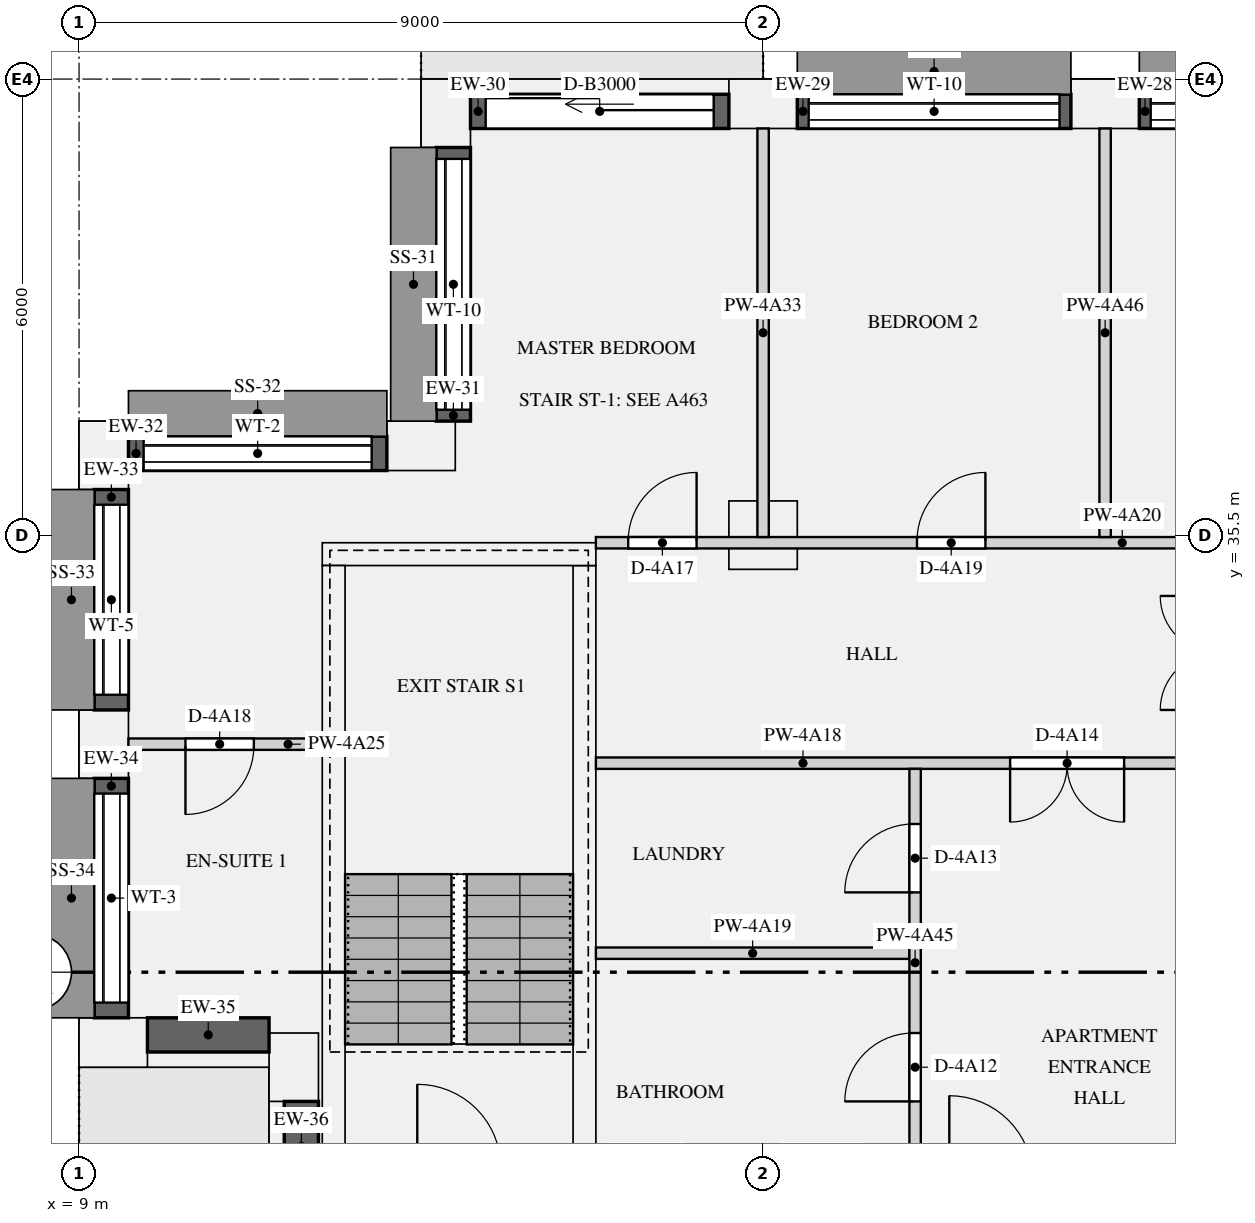
"""IFC4 building model, lengths in metres.
Left out: names, types, materials, properties, quantities, classifications, styles, units other than length and angle.
Written with IfcOpenShell. Run it as: python <this file> out.ifc"""

import sys

from ifc_helpers import new_model, si_unit, direction, frame, frame_2d, origin, origin_2d, place, context, subcontext, project, spatial, rectangle, extrude, element, fill, save


model = new_model("IFC4")
c1 = context("Model", 3, precision=1e-05, world=origin(), true_north=direction((0.0, 1.0)))
c2 = subcontext(c1, "Body", "Model", "MODEL_VIEW")
j1 = project(units=[si_unit("LENGTHUNIT", "METRE"), si_unit("PLANEANGLEUNIT", "RADIAN")], contexts=[c1])
p1 = place(None, origin())
s1 = spatial("IfcSite", under=j1, at=p1, CompositionType="ELEMENT")
p2 = place(p1, origin())
s2 = spatial("IfcBuilding", under=s1, at=p2, CompositionType="ELEMENT")
p3 = place(p2, frame((0.0, 0.0, 198.0)))
s3 = spatial("IfcBuildingStorey", under=s2, at=p3, CompositionType="ELEMENT", Elevation=198.0)
for number, where, z_axis, x_axis in (
    (1, (22.5, 41.175, 0.0), (0.0, 0.0, 1.0), (-1.0, 0.0, 0.0)),
    (2, (18.0, 41.175, 0.0), (0.0, 0.0, 1.0), (-1.0, 0.0, 0.0)),
    (3, (13.825, 41.05, 0.0), (0.0, 0.0, 1.0), (0.0, -1.0, 0.0)),
    (4, (13.5, 36.675, 0.0), (0.0, 0.0, 1.0), (-1.0, 0.0, 0.0)),
    (5, (9.325, 36.55, 0.0), (0.0, 0.0, 1.0), (0.0, -1.0, 0.0)),
    (6, (9.325, 32.75, 0.0), (0.0, 0.0, 1.0), (0.0, -1.0, 0.0)),
    (7, (9.45, 28.825, 0.0), (0.0, 0.0, 1.0), (1.0, 0.0, 0.0)),
    (8, (11.825, 28.5, 0.0), (0.0, 0.0, 1.0), (0.0, -1.0, 0.0)),
):
    element("IfcColumn", number, at=place(p3, frame(where, z_axis=z_axis, x_axis=x_axis)), inside=s3, PredefinedType="USERDEFINED", context=c2, shape_type="SweptSolid", body=[
        extrude(rectangle(XDim=0.9, YDim=0.65, at=origin_2d()), origin(), (0.0, 0.0, 1.0), 3.15),
    ])
p4 = place(p3, frame((18.0, 35.5, 0.0), z_axis=(0.0, 0.0, 1.0), x_axis=(1.0, 0.0, 0.0)))
e9 = element("IfcColumn", 9, at=p4, inside=s3, PredefinedType="COLUMN", context=c2, shape_type="SweptSolid", body=[
    extrude(rectangle(XDim=0.9, YDim=0.9, at=origin_2d()), origin(), (0.0, 0.0, 1.0), 3.15),
])
p5 = place(p3, frame((12.2, 35.25, 0.0), z_axis=(0.0, 0.0, 1.0), x_axis=(1.0, 0.0, 0.0)))
e10 = element("IfcWall", 10, at=p5, inside=s3, PredefinedType="SHEAR", context=c2, shape_type="SweptSolid", body=[
    extrude(rectangle(XDim=3.6, YDim=0.3, at=frame_2d((1.8, 0.0))), origin(), (0.0, 0.0, 1.0), 3.15),
])
for number, where, z_axis, x_axis in (
    (11, (12.35, 27.3, 0.0), (0.0, 0.0, 1.0), (0.0, 1.0, 0.0)),
    (12, (15.65, 27.3, 0.0), (0.0, 0.0, 1.0), (0.0, 1.0, 0.0)),
):
    element("IfcWall", number, at=place(p3, frame(where, z_axis=z_axis, x_axis=x_axis)), inside=s3, PredefinedType="SHEAR", context=c2, shape_type="SweptSolid", body=[
        extrude(rectangle(XDim=7.8, YDim=0.3, at=frame_2d((3.9, 0.0))), origin(), (0.0, 0.0, 1.0), 3.15),
    ])
p6 = place(p3, frame((26.55, 41.075, 0.9), z_axis=(0.0, 0.0, 1.0), x_axis=(-1.0, 0.0, 0.0)))
e13 = element("IfcWall", 13, at=p6, inside=s3, PredefinedType="SOLIDWALL", context=c2, shape_type="SweptSolid", body=[
    extrude(rectangle(XDim=3.6, YDim=0.45, at=frame_2d((1.8, 0.0))), origin(), (0.0, 0.0, 1.0), 1.93),
])
p7 = place(p6, frame((0.15, 0.0, 0.15)))
e14 = element("IfcOpeningElement", 14, at=p7, cuts=e13, PredefinedType="OPENING", context=c2, shape_type="SweptSolid", body=[
    extrude(rectangle(XDim=3.3, YDim=1.5, at=frame_2d((1.65, 0.75))), frame((0.0, 0.235, 0.0), z_axis=(0.0, -1.0, 0.0), x_axis=(1.0, 0.0, 0.0)), (0.0, 0.0, 1.0), 0.47),
])
p8 = place(p3, frame((22.05, 41.075, 0.9), z_axis=(0.0, 0.0, 1.0), x_axis=(-1.0, 0.0, 0.0)))
e15 = element("IfcWall", 15, at=p8, inside=s3, PredefinedType="SOLIDWALL", context=c2, shape_type="SweptSolid", body=[
    extrude(rectangle(XDim=3.6, YDim=0.45, at=frame_2d((1.8, 0.0))), origin(), (0.0, 0.0, 1.0), 1.93),
])
p9 = place(p8, frame((0.15, 0.0, 0.15)))
e16 = element("IfcOpeningElement", 16, at=p9, cuts=e15, PredefinedType="OPENING", context=c2, shape_type="SweptSolid", body=[
    extrude(rectangle(XDim=3.3, YDim=1.5, at=frame_2d((1.65, 0.75))), frame((0.0, 0.235, 0.0), z_axis=(0.0, -1.0, 0.0), x_axis=(1.0, 0.0, 0.0)), (0.0, 0.0, 1.0), 0.47),
])
p10 = place(p3, frame((17.55, 41.075, 0.0), z_axis=(0.0, 0.0, 1.0), x_axis=(-1.0, 0.0, 0.0)))
e17 = element("IfcWall", 17, at=p10, inside=s3, PredefinedType="SOLIDWALL", context=c2, shape_type="SweptSolid", body=[
    extrude(rectangle(XDim=3.4, YDim=0.45, at=frame_2d((1.7, 0.0))), origin(), (0.0, 0.0, 1.0), 2.83),
])
p11 = place(p10, frame((0.2, 0.0, 0.0)))
e18 = element("IfcOpeningElement", 18, at=p11, cuts=e17, PredefinedType="OPENING", context=c2, shape_type="SweptSolid", body=[
    extrude(rectangle(XDim=3.0, YDim=2.3, at=frame_2d((1.5, 1.15))), frame((0.0, 0.235, 0.0), z_axis=(0.0, -1.0, 0.0), x_axis=(1.0, 0.0, 0.0)), (0.0, 0.0, 1.0), 0.47),
])
p12 = place(p3, frame((13.925, 40.6, 0.9), z_axis=(0.0, 0.0, 1.0), x_axis=(0.0, -1.0, 0.0)))
e19 = element("IfcWall", 19, at=p12, inside=s3, PredefinedType="SOLIDWALL", context=c2, shape_type="SweptSolid", body=[
    extrude(rectangle(XDim=3.6, YDim=0.45, at=frame_2d((1.8, 0.0))), origin(), (0.0, 0.0, 1.0), 1.93),
])
p13 = place(p12, frame((0.15, 0.0, 0.15)))
e20 = element("IfcOpeningElement", 20, at=p13, cuts=e19, PredefinedType="OPENING", context=c2, shape_type="SweptSolid", body=[
    extrude(rectangle(XDim=3.3, YDim=1.5, at=frame_2d((1.65, 0.75))), frame((0.0, 0.235, 0.0), z_axis=(0.0, -1.0, 0.0), x_axis=(1.0, 0.0, 0.0)), (0.0, 0.0, 1.0), 0.47),
])
p14 = place(p3, frame((13.05, 36.575, 0.9), z_axis=(0.0, 0.0, 1.0), x_axis=(-1.0, 0.0, 0.0)))
e21 = element("IfcWall", 21, at=p14, inside=s3, PredefinedType="SOLIDWALL", context=c2, shape_type="SweptSolid", body=[
    extrude(rectangle(XDim=3.4, YDim=0.45, at=frame_2d((1.7, 0.0))), origin(), (0.0, 0.0, 1.0), 1.93),
])
p15 = place(p14, frame((0.2, 0.0, 0.15)))
e22 = element("IfcOpeningElement", 22, at=p15, cuts=e21, PredefinedType="OPENING", context=c2, shape_type="SweptSolid", body=[
    extrude(rectangle(XDim=3.0, YDim=1.5, at=frame_2d((1.5, 0.75))), frame((0.0, 0.235, 0.0), z_axis=(0.0, -1.0, 0.0), x_axis=(1.0, 0.0, 0.0)), (0.0, 0.0, 1.0), 0.47),
])
p16 = place(p3, frame((9.425, 36.1, 0.9), z_axis=(0.0, 0.0, 1.0), x_axis=(0.0, -1.0, 0.0)))
e23 = element("IfcWall", 23, at=p16, inside=s3, PredefinedType="SOLIDWALL", context=c2, shape_type="SweptSolid", body=[
    extrude(rectangle(XDim=2.9, YDim=0.45, at=frame_2d((1.45, 0.0))), origin(), (0.0, 0.0, 1.0), 1.93),
])
p17 = place(p16, frame((0.2, 0.0, 0.15)))
e24 = element("IfcOpeningElement", 24, at=p17, cuts=e23, PredefinedType="OPENING", context=c2, shape_type="SweptSolid", body=[
    extrude(rectangle(XDim=2.5, YDim=1.5, at=frame_2d((1.25, 0.75))), frame((0.0, 0.235, 0.0), z_axis=(0.0, -1.0, 0.0), x_axis=(1.0, 0.0, 0.0)), (0.0, 0.0, 1.0), 0.47),
])
p18 = place(p3, frame((9.425, 32.3, 0.9), z_axis=(0.0, 0.0, 1.0), x_axis=(0.0, -1.0, 0.0)))
e25 = element("IfcWall", 25, at=p18, inside=s3, PredefinedType="SOLIDWALL", context=c2, shape_type="SweptSolid", body=[
    extrude(rectangle(XDim=3.15, YDim=0.45, at=frame_2d((1.575, 0.0))), origin(), (0.0, 0.0, 1.0), 1.93),
])
p19 = place(p18, frame((0.2, 0.0, 0.15)))
e26 = element("IfcOpeningElement", 26, at=p19, cuts=e25, PredefinedType="OPENING", context=c2, shape_type="SweptSolid", body=[
    extrude(rectangle(XDim=2.75, YDim=1.5, at=frame_2d((1.375, 0.75))), frame((0.0, 0.235, 0.0), z_axis=(0.0, -1.0, 0.0), x_axis=(1.0, 0.0, 0.0)), (0.0, 0.0, 1.0), 0.47),
])
p20 = place(p3, frame((9.9, 28.925, 0.9), z_axis=(0.0, 0.0, 1.0), x_axis=(1.0, 0.0, 0.0)))
e27 = element("IfcWall", 27, at=p20, inside=s3, PredefinedType="SOLIDWALL", context=c2, shape_type="SweptSolid", body=[
    extrude(rectangle(XDim=1.6, YDim=0.45, at=frame_2d((0.8, 0.0))), origin(), (0.0, 0.0, 1.0), 1.93),
])
p21 = place(p3, frame((11.925, 28.05, 0.0), z_axis=(0.0, 0.0, 1.0), x_axis=(0.0, -1.0, 0.0)))
e28 = element("IfcWall", 28, at=p21, inside=s3, PredefinedType="SOLIDWALL", context=c2, shape_type="SweptSolid", body=[
    extrude(rectangle(XDim=3.1, YDim=0.45, at=frame_2d((1.55, 0.0))), origin(), (0.0, 0.0, 1.0), 2.83),
])
p22 = place(p21, frame((1.185, 0.0, 0.0)))
e29 = element("IfcOpeningElement", 29, at=p22, cuts=e28, PredefinedType="OPENING", context=c2, shape_type="SweptSolid", body=[
    extrude(rectangle(XDim=1.75, YDim=2.3, at=frame_2d((0.875, 1.15))), frame((0.0, 0.235, 0.0), z_axis=(0.0, -1.0, 0.0), x_axis=(1.0, 0.0, 0.0)), (0.0, 0.0, 1.0), 0.47),
])
p23 = place(p3, frame((15.8, 32.5, 0.0), z_axis=(0.0, 0.0, 1.0), x_axis=(1.0, 0.0, 0.0)))
e30 = element("IfcWall", 30, at=p23, inside=s3, PredefinedType="PARTITIONING", context=c2, shape_type="SweptSolid", body=[
    extrude(rectangle(XDim=8.125, YDim=0.15, at=frame_2d((4.062, 0.0))), origin(), (0.0, 0.0, 1.0), 2.83),
])
p24 = place(p23, frame((5.45, 0.0, 0.0)))
e31 = element("IfcOpeningElement", 31, at=p24, cuts=e30, PredefinedType="OPENING", context=c2, shape_type="SweptSolid", body=[
    extrude(rectangle(XDim=1.5, YDim=2.1, at=frame_2d((0.75, 1.05))), frame((0.0, 0.085, 0.0), z_axis=(0.0, -1.0, 0.0), x_axis=(1.0, 0.0, 0.0)), (0.0, 0.0, 1.0), 0.17),
])
p25 = place(p3, frame((15.8, 30.0, 0.0), z_axis=(0.0, 0.0, 1.0), x_axis=(1.0, 0.0, 0.0)))
e32 = element("IfcWall", 32, at=p25, inside=s3, PredefinedType="PARTITIONING", context=c2, shape_type="SweptSolid", body=[
    extrude(rectangle(XDim=4.125, YDim=0.15, at=frame_2d((2.062, 0.0))), origin(), (0.0, 0.0, 1.0), 2.83),
])
p26 = place(p3, frame((15.8, 35.4, 0.0), z_axis=(0.0, 0.0, 1.0), x_axis=(1.0, 0.0, 0.0)))
e33 = element("IfcWall", 33, at=p26, inside=s3, PredefinedType="PARTITIONING", context=c2, shape_type="SweptSolid", body=[
    extrude(rectangle(XDim=11.2, YDim=0.15, at=frame_2d((5.6, 0.0))), origin(), (0.0, 0.0, 1.0), 2.83),
])
p27 = place(p26, frame((0.425, 0.0, 0.0)))
e34 = element("IfcOpeningElement", 34, at=p27, cuts=e33, PredefinedType="OPENING", context=c2, shape_type="SweptSolid", body=[
    extrude(rectangle(XDim=0.9, YDim=2.1, at=frame_2d((0.45, 1.05))), frame((0.0, 0.085, 0.0), z_axis=(0.0, -1.0, 0.0), x_axis=(1.0, 0.0, 0.0)), (0.0, 0.0, 1.0), 0.17),
])
p28 = place(p26, frame((4.225, 0.0, 0.0)))
e35 = element("IfcOpeningElement", 35, at=p28, cuts=e33, PredefinedType="OPENING", context=c2, shape_type="SweptSolid", body=[
    extrude(rectangle(XDim=0.9, YDim=2.1, at=frame_2d((0.45, 1.05))), frame((0.0, 0.085, 0.0), z_axis=(0.0, -1.0, 0.0), x_axis=(1.0, 0.0, 0.0)), (0.0, 0.0, 1.0), 0.17),
])
p29 = place(p26, frame((8.725, 0.0, 0.0)))
e36 = element("IfcOpeningElement", 36, at=p29, cuts=e33, PredefinedType="OPENING", context=c2, shape_type="SweptSolid", body=[
    extrude(rectangle(XDim=1.5, YDim=2.1, at=frame_2d((0.75, 1.05))), frame((0.0, 0.085, 0.0), z_axis=(0.0, -1.0, 0.0), x_axis=(1.0, 0.0, 0.0)), (0.0, 0.0, 1.0), 0.17),
])
p30 = place(p3, frame((9.65, 32.75, 0.0), z_axis=(0.0, 0.0, 1.0), x_axis=(1.0, 0.0, 0.0)))
e37 = element("IfcWall", 37, at=p30, inside=s3, PredefinedType="PARTITIONING", context=c2, shape_type="SweptSolid", body=[
    extrude(rectangle(XDim=2.55, YDim=0.15, at=frame_2d((1.275, 0.0))), origin(), (0.0, 0.0, 1.0), 2.83),
])
p31 = place(p30, frame((0.75, 0.0, 0.0)))
e38 = element("IfcOpeningElement", 38, at=p31, cuts=e37, PredefinedType="OPENING", context=c2, shape_type="SweptSolid", body=[
    extrude(rectangle(XDim=0.9, YDim=2.1, at=frame_2d((0.45, 1.05))), frame((0.0, 0.085, 0.0), z_axis=(0.0, -1.0, 0.0), x_axis=(1.0, 0.0, 0.0)), (0.0, 0.0, 1.0), 0.17),
])
p32 = place(p3, frame((18.0, 35.475, 0.0), z_axis=(0.0, 0.0, 1.0), x_axis=(0.0, 1.0, 0.0)))
e39 = element("IfcWall", 39, at=p32, inside=s3, PredefinedType="PARTITIONING", context=c2, shape_type="SweptSolid", body=[
    extrude(rectangle(XDim=5.375, YDim=0.15, at=frame_2d((2.688, 0.0))), origin(), (0.0, 0.0, 1.0), 2.83),
])
p33 = place(p3, frame((20.0, 27.1, 0.0), z_axis=(0.0, 0.0, 1.0), x_axis=(0.0, 1.0, 0.0)))
e40 = element("IfcWall", 40, at=p33, inside=s3, PredefinedType="PARTITIONING", context=c2, shape_type="SweptSolid", body=[
    extrude(rectangle(XDim=5.325, YDim=0.15, at=frame_2d((2.663, 0.0))), origin(), (0.0, 0.0, 1.0), 2.83),
])
p34 = place(p33, frame((0.95, 0.0, 0.0)))
e41 = element("IfcOpeningElement", 41, at=p34, cuts=e40, PredefinedType="OPENING", context=c2, shape_type="SweptSolid", body=[
    extrude(rectangle(XDim=0.9, YDim=2.1, at=frame_2d((0.45, 1.05))), frame((0.0, 0.085, 0.0), z_axis=(0.0, -1.0, 0.0), x_axis=(1.0, 0.0, 0.0)), (0.0, 0.0, 1.0), 0.17),
])
p35 = place(p33, frame((3.7, 0.0, 0.0)))
e42 = element("IfcOpeningElement", 42, at=p35, cuts=e40, PredefinedType="OPENING", context=c2, shape_type="SweptSolid", body=[
    extrude(rectangle(XDim=0.9, YDim=2.1, at=frame_2d((0.45, 1.05))), frame((0.0, 0.085, 0.0), z_axis=(0.0, -1.0, 0.0), x_axis=(1.0, 0.0, 0.0)), (0.0, 0.0, 1.0), 0.17),
])
p36 = place(p3, frame((22.5, 35.475, 0.0), z_axis=(0.0, 0.0, 1.0), x_axis=(0.0, 1.0, 0.0)))
e43 = element("IfcWall", 43, at=p36, inside=s3, PredefinedType="PARTITIONING", context=c2, shape_type="SweptSolid", body=[
    extrude(rectangle(XDim=5.375, YDim=0.15, at=frame_2d((2.688, 0.0))), origin(), (0.0, 0.0, 1.0), 2.83),
])
p37 = place(p7, origin())
e44 = element("IfcWindow", 44, at=p37, inside=s3, PartitioningType="SINGLE_PANEL", PredefinedType="WINDOW", context=c2, shape_type="SweptSolid", body=[
    extrude(rectangle(XDim=3.3, YDim=1.5, at=frame_2d((1.65, 0.75))), frame((0.0, -0.065, 0.0), z_axis=(0.0, -1.0, 0.0), x_axis=(1.0, 0.0, 0.0)), (0.0, 0.0, 1.0), 0.06),
])
fill(e14, e44)
p38 = place(p9, origin())
e45 = element("IfcWindow", 45, at=p38, inside=s3, PartitioningType="SINGLE_PANEL", PredefinedType="WINDOW", context=c2, shape_type="SweptSolid", body=[
    extrude(rectangle(XDim=3.3, YDim=1.5, at=frame_2d((1.65, 0.75))), frame((0.0, -0.065, 0.0), z_axis=(0.0, -1.0, 0.0), x_axis=(1.0, 0.0, 0.0)), (0.0, 0.0, 1.0), 0.06),
])
fill(e16, e45)
p39 = place(p11, origin())
e46 = element("IfcDoor", 46, at=p39, inside=s3, OperationType="SLIDING_TO_LEFT", PredefinedType="DOOR", context=c2, shape_type="SweptSolid", body=[
    extrude(rectangle(XDim=3.0, YDim=2.3, at=frame_2d((1.5, 1.15))), frame((0.0, -0.07, 0.0), z_axis=(0.0, -1.0, 0.0), x_axis=(1.0, 0.0, 0.0)), (0.0, 0.0, 1.0), 0.05),
])
fill(e18, e46)
p40 = place(p13, origin())
e47 = element("IfcWindow", 47, at=p40, inside=s3, PartitioningType="SINGLE_PANEL", PredefinedType="WINDOW", context=c2, shape_type="SweptSolid", body=[
    extrude(rectangle(XDim=3.3, YDim=1.5, at=frame_2d((1.65, 0.75))), frame((0.0, -0.065, 0.0), z_axis=(0.0, -1.0, 0.0), x_axis=(1.0, 0.0, 0.0)), (0.0, 0.0, 1.0), 0.06),
])
fill(e20, e47)
p41 = place(p15, origin())
e48 = element("IfcWindow", 48, at=p41, inside=s3, PartitioningType="SINGLE_PANEL", PredefinedType="WINDOW", context=c2, shape_type="SweptSolid", body=[
    extrude(rectangle(XDim=3.0, YDim=1.5, at=frame_2d((1.5, 0.75))), frame((0.0, -0.065, 0.0), z_axis=(0.0, -1.0, 0.0), x_axis=(1.0, 0.0, 0.0)), (0.0, 0.0, 1.0), 0.06),
])
fill(e22, e48)
p42 = place(p17, origin())
e49 = element("IfcWindow", 49, at=p42, inside=s3, PartitioningType="SINGLE_PANEL", PredefinedType="WINDOW", context=c2, shape_type="SweptSolid", body=[
    extrude(rectangle(XDim=2.5, YDim=1.5, at=frame_2d((1.25, 0.75))), frame((0.0, -0.065, 0.0), z_axis=(0.0, -1.0, 0.0), x_axis=(1.0, 0.0, 0.0)), (0.0, 0.0, 1.0), 0.06),
])
fill(e24, e49)
p43 = place(p19, origin())
e50 = element("IfcWindow", 50, at=p43, inside=s3, PartitioningType="SINGLE_PANEL", PredefinedType="WINDOW", context=c2, shape_type="SweptSolid", body=[
    extrude(rectangle(XDim=2.75, YDim=1.5, at=frame_2d((1.375, 0.75))), frame((0.0, -0.065, 0.0), z_axis=(0.0, -1.0, 0.0), x_axis=(1.0, 0.0, 0.0)), (0.0, 0.0, 1.0), 0.06),
])
fill(e26, e50)
p44 = place(p34, origin())
e51 = element("IfcDoor", 51, at=p44, inside=s3, OperationType="SINGLE_SWING_LEFT", PredefinedType="DOOR", context=c2, shape_type="SweptSolid", body=[
    extrude(rectangle(XDim=0.9, YDim=2.1, at=frame_2d((0.45, 1.05))), frame((0.0, 0.025, 0.0), z_axis=(0.0, -1.0, 0.0), x_axis=(1.0, 0.0, 0.0)), (0.0, 0.0, 1.0), 0.05),
])
fill(e41, e51)
p45 = place(p35, origin())
e52 = element("IfcDoor", 52, at=p45, inside=s3, OperationType="SINGLE_SWING_LEFT", PredefinedType="DOOR", context=c2, shape_type="SweptSolid", body=[
    extrude(rectangle(XDim=0.9, YDim=2.1, at=frame_2d((0.45, 1.05))), frame((0.0, 0.025, 0.0), z_axis=(0.0, -1.0, 0.0), x_axis=(1.0, 0.0, 0.0)), (0.0, 0.0, 1.0), 0.05),
])
fill(e42, e52)
p46 = place(p24, frame((1.5, 0.0, 0.0), z_axis=(0.0, 0.0, 1.0), x_axis=(-1.0, 0.0, 0.0)))
e53 = element("IfcDoor", 53, at=p46, inside=s3, OperationType="DOUBLE_DOOR_SINGLE_SWING", PredefinedType="DOOR", context=c2, shape_type="SweptSolid", body=[
    extrude(rectangle(XDim=1.5, YDim=2.1, at=frame_2d((0.75, 1.05))), frame((0.0, 0.025, 0.0), z_axis=(0.0, -1.0, 0.0), x_axis=(1.0, 0.0, 0.0)), (0.0, 0.0, 1.0), 0.05),
])
fill(e31, e53)
p47 = place(p27, origin())
e54 = element("IfcDoor", 54, at=p47, inside=s3, OperationType="SINGLE_SWING_RIGHT", PredefinedType="DOOR", context=c2, shape_type="SweptSolid", body=[
    extrude(rectangle(XDim=0.9, YDim=2.1, at=frame_2d((0.45, 1.05))), frame((0.0, 0.025, 0.0), z_axis=(0.0, -1.0, 0.0), x_axis=(1.0, 0.0, 0.0)), (0.0, 0.0, 1.0), 0.05),
])
fill(e34, e54)
p48 = place(p31, frame((0.9, 0.0, 0.0), z_axis=(0.0, 0.0, 1.0), x_axis=(-1.0, 0.0, 0.0)))
e55 = element("IfcDoor", 55, at=p48, inside=s3, OperationType="SINGLE_SWING_RIGHT", PredefinedType="DOOR", context=c2, shape_type="SweptSolid", body=[
    extrude(rectangle(XDim=0.9, YDim=2.1, at=frame_2d((0.45, 1.05))), frame((0.0, 0.025, 0.0), z_axis=(0.0, -1.0, 0.0), x_axis=(1.0, 0.0, 0.0)), (0.0, 0.0, 1.0), 0.05),
])
fill(e38, e55)
p49 = place(p28, origin())
e56 = element("IfcDoor", 56, at=p49, inside=s3, OperationType="SINGLE_SWING_RIGHT", PredefinedType="DOOR", context=c2, shape_type="SweptSolid", body=[
    extrude(rectangle(XDim=0.9, YDim=2.1, at=frame_2d((0.45, 1.05))), frame((0.0, 0.025, 0.0), z_axis=(0.0, -1.0, 0.0), x_axis=(1.0, 0.0, 0.0)), (0.0, 0.0, 1.0), 0.05),
])
fill(e35, e56)
save(model, sys.argv[1])
